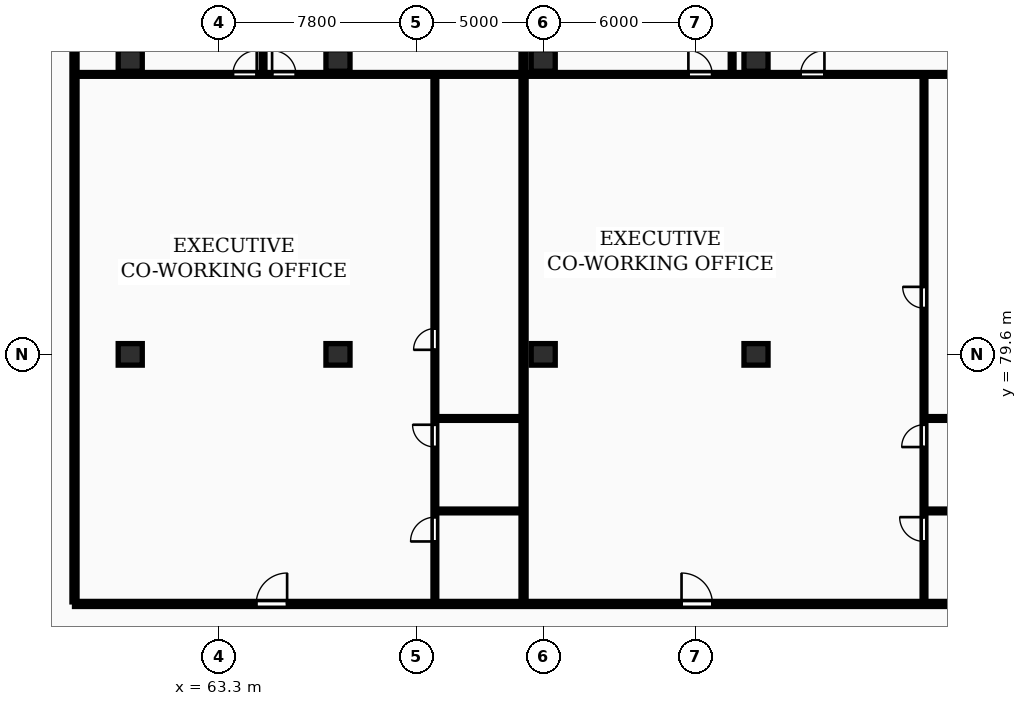
"""IFC4 building model, lengths in metres.
Left out: names, types, materials, properties, quantities, classifications, styles, units other than length and angle.
Written with IfcOpenShell. Run it as: python <this file> out.ifc"""

import sys

from ifc_helpers import new_model, si_unit, direction, frame, frame_2d, origin, origin_2d, place, context, subcontext, project, spatial, rectangle, extrude, element, fill, save


model = new_model("IFC4")
c1 = context("Model", 3, precision=1e-05, world=origin(), true_north=direction((0.0, 1.0)))
c2 = subcontext(c1, "Body", "Model", "MODEL_VIEW")
j1 = project(units=[si_unit("LENGTHUNIT", "METRE"), si_unit("PLANEANGLEUNIT", "RADIAN")], contexts=[c1])
p1 = place(None, origin())
s1 = spatial("IfcSite", under=j1, at=p1, CompositionType="ELEMENT")
p2 = place(p1, origin())
s2 = spatial("IfcBuilding", under=s1, at=p2, CompositionType="ELEMENT")
p3 = place(p2, frame((0.0, 0.0, 106.8)))
s3 = spatial("IfcBuildingStorey", under=s2, at=p3, CompositionType="ELEMENT", Elevation=106.8)
for number, where, z_axis, x_axis in (
    (1, (59.8, 79.6, 0.0), (0.0, 0.0, 1.0), (1.0, 0.0, 0.0)),
    (2, (59.8, 91.2, 0.0), (0.0, 0.0, 1.0), (1.0, 0.0, 0.0)),
    (3, (68.0, 79.6, 0.0), (0.0, 0.0, 1.0), (1.0, 0.0, 0.0)),
    (4, (68.0, 91.2, 0.0), (0.0, 0.0, 1.0), (1.0, 0.0, 0.0)),
    (5, (76.1, 79.6, 0.0), (0.0, 0.0, 1.0), (1.0, 0.0, 0.0)),
    (6, (76.1, 91.2, 0.0), (0.0, 0.0, 1.0), (1.0, 0.0, 0.0)),
    (7, (84.5, 79.6, 0.0), (0.0, 0.0, 1.0), (1.0, 0.0, 0.0)),
    (8, (84.5, 91.2, 0.0), (0.0, 0.0, 1.0), (1.0, 0.0, 0.0)),
):
    element("IfcColumn", number, at=place(p3, frame(where, z_axis=z_axis, x_axis=x_axis)), inside=s3, PredefinedType="COLUMN", context=c2, shape_type="SweptSolid", body=[
        extrude(rectangle(XDim=0.95, YDim=0.85, at=origin_2d()), origin(), (0.0, 0.0, 1.0), 3.25),
    ])
for number, where, z_axis, x_axis in (
    (9, (57.6, 69.83, 0.0), (0.0, 0.0, 1.0), (0.0, 1.0, 0.0)),
    (10, (75.325, 69.83, 0.0), (0.0, 0.0, 1.0), (0.0, 1.0, 0.0)),
):
    element("IfcWall", number, at=place(p3, frame(where, z_axis=z_axis, x_axis=x_axis)), inside=s3, PredefinedType="PARTITIONING", context=c2, shape_type="SweptSolid", body=[
        extrude(rectangle(XDim=26.07, YDim=0.2, at=frame_2d((13.035, 0.0))), origin(), (0.0, 0.0, 1.0), 2.97),
    ])
for number, where, z_axis, x_axis in (
    (11, (71.885, 73.42, 0.0), (0.0, 0.0, 1.0), (1.0, 0.0, 0.0)),
    (12, (71.885, 77.07, 0.0), (0.0, 0.0, 1.0), (1.0, 0.0, 0.0)),
):
    element("IfcWall", number, at=place(p3, frame(where, z_axis=z_axis, x_axis=x_axis)), inside=s3, PredefinedType="PARTITIONING", context=c2, shape_type="SweptSolid", body=[
        extrude(rectangle(XDim=3.36, YDim=0.15, at=frame_2d((1.68, 0.0))), origin(), (0.0, 0.0, 1.0), 2.97),
    ])
p4 = place(p3, frame((71.825, 69.81, 0.0), z_axis=(0.0, 0.0, 1.0), x_axis=(0.0, 1.0, 0.0)))
e13 = element("IfcWall", 13, at=p4, inside=s3, PredefinedType="PARTITIONING", context=c2, shape_type="SweptSolid", body=[
    extrude(rectangle(XDim=20.78, YDim=0.15, at=frame_2d((10.39, 0.0))), origin(), (0.0, 0.0, 1.0), 2.97),
])
p5 = place(p4, frame((2.406, 0.0, 0.0)))
e14 = element("IfcOpeningElement", 14, at=p5, cuts=e13, PredefinedType="OPENING", context=c2, shape_type="SweptSolid", body=[
    extrude(rectangle(XDim=0.96, YDim=2.1, at=frame_2d((0.48, 1.05))), frame((0.0, 0.085, 0.0), z_axis=(0.0, -1.0, 0.0), x_axis=(1.0, 0.0, 0.0)), (0.0, 0.0, 1.0), 0.17),
])
p6 = place(p4, frame((6.133, 0.0, 0.0)))
e15 = element("IfcOpeningElement", 15, at=p6, cuts=e13, PredefinedType="OPENING", context=c2, shape_type="SweptSolid", body=[
    extrude(rectangle(XDim=0.88, YDim=2.06, at=frame_2d((0.44, 1.03))), frame((0.0, 0.085, 0.0), z_axis=(0.0, -1.0, 0.0), x_axis=(1.0, 0.0, 0.0)), (0.0, 0.0, 1.0), 0.17),
])
p7 = place(p4, frame((9.97, 0.0, 0.0)))
e16 = element("IfcOpeningElement", 16, at=p7, cuts=e13, PredefinedType="OPENING", context=c2, shape_type="SweptSolid", body=[
    extrude(rectangle(XDim=0.84, YDim=2.04, at=frame_2d((0.42, 1.02))), frame((0.0, 0.085, 0.0), z_axis=(0.0, -1.0, 0.0), x_axis=(1.0, 0.0, 0.0)), (0.0, 0.0, 1.0), 0.17),
])
p8 = place(p3, frame((65.042, 90.73, 0.0), z_axis=(0.0, 0.0, 1.0), x_axis=(0.0, 1.0, 0.0)))
e17 = element("IfcWall", 17, at=p8, inside=s3, PredefinedType="PARTITIONING", context=c2, shape_type="SweptSolid", body=[
    extrude(rectangle(XDim=5.17, YDim=0.15, at=frame_2d((2.585, 0.0))), origin(), (0.0, 0.0, 1.0), 2.97),
])
p9 = place(p3, frame((57.68, 90.65, 0.0), z_axis=(0.0, 0.0, 1.0), x_axis=(1.0, 0.0, 0.0)))
e18 = element("IfcWall", 18, at=p9, inside=s3, PredefinedType="PARTITIONING", context=c2, shape_type="SweptSolid", body=[
    extrude(rectangle(XDim=17.565, YDim=0.15, at=frame_2d((8.782, 0.0))), origin(), (0.0, 0.0, 1.0), 2.97),
])
p10 = place(p9, frame((6.172, 0.0, 0.0)))
e19 = element("IfcOpeningElement", 19, at=p10, cuts=e18, PredefinedType="OPENING", context=c2, shape_type="SweptSolid", body=[
    extrude(rectangle(XDim=0.94, YDim=2.1, at=frame_2d((0.47, 1.05))), frame((0.0, 0.085, 0.0), z_axis=(0.0, -1.0, 0.0), x_axis=(1.0, 0.0, 0.0)), (0.0, 0.0, 1.0), 0.17),
])
p11 = place(p9, frame((7.719, 0.0, 0.0)))
e20 = element("IfcOpeningElement", 20, at=p11, cuts=e18, PredefinedType="OPENING", context=c2, shape_type="SweptSolid", body=[
    extrude(rectangle(XDim=0.94, YDim=2.1, at=frame_2d((0.47, 1.05))), frame((0.0, 0.085, 0.0), z_axis=(0.0, -1.0, 0.0), x_axis=(1.0, 0.0, 0.0)), (0.0, 0.0, 1.0), 0.17),
])
for number, where, z_axis, x_axis in (
    (21, (91.191, 73.42, 0.0), (0.0, 0.0, 1.0), (1.0, 0.0, 0.0)),
    (22, (91.191, 77.07, 0.0), (0.0, 0.0, 1.0), (1.0, 0.0, 0.0)),
):
    element("IfcWall", number, at=place(p3, frame(where, z_axis=z_axis, x_axis=x_axis)), inside=s3, PredefinedType="PARTITIONING", context=c2, shape_type="SweptSolid", body=[
        extrude(rectangle(XDim=3.13, YDim=0.15, at=frame_2d((1.565, 0.0))), origin(), (0.0, 0.0, 1.0), 2.97),
    ])
p12 = place(p3, frame((91.131, 69.81, 0.0), z_axis=(0.0, 0.0, 1.0), x_axis=(0.0, 1.0, 0.0)))
e23 = element("IfcWall", 23, at=p12, inside=s3, PredefinedType="PARTITIONING", context=c2, shape_type="SweptSolid", body=[
    extrude(rectangle(XDim=20.78, YDim=0.15, at=frame_2d((10.39, 0.0))), origin(), (0.0, 0.0, 1.0), 2.97),
])
p13 = place(p12, frame((2.406, 0.0, 0.0)))
e24 = element("IfcOpeningElement", 24, at=p13, cuts=e23, PredefinedType="OPENING", context=c2, shape_type="SweptSolid", body=[
    extrude(rectangle(XDim=0.96, YDim=2.1, at=frame_2d((0.48, 1.05))), frame((0.0, 0.085, 0.0), z_axis=(0.0, -1.0, 0.0), x_axis=(1.0, 0.0, 0.0)), (0.0, 0.0, 1.0), 0.17),
])
p14 = place(p12, frame((6.133, 0.0, 0.0)))
e25 = element("IfcOpeningElement", 25, at=p14, cuts=e23, PredefinedType="OPENING", context=c2, shape_type="SweptSolid", body=[
    extrude(rectangle(XDim=0.88, YDim=2.06, at=frame_2d((0.44, 1.03))), frame((0.0, 0.085, 0.0), z_axis=(0.0, -1.0, 0.0), x_axis=(1.0, 0.0, 0.0)), (0.0, 0.0, 1.0), 0.17),
])
p15 = place(p12, frame((11.615, 0.0, 0.0)))
e26 = element("IfcOpeningElement", 26, at=p15, cuts=e23, PredefinedType="OPENING", context=c2, shape_type="SweptSolid", body=[
    extrude(rectangle(XDim=0.84, YDim=2.04, at=frame_2d((0.42, 1.02))), frame((0.0, 0.085, 0.0), z_axis=(0.0, -1.0, 0.0), x_axis=(1.0, 0.0, 0.0)), (0.0, 0.0, 1.0), 0.17),
])
p16 = place(p3, frame((83.558, 90.73, 0.0), z_axis=(0.0, 0.0, 1.0), x_axis=(0.0, 1.0, 0.0)))
e27 = element("IfcWall", 27, at=p16, inside=s3, PredefinedType="PARTITIONING", context=c2, shape_type="SweptSolid", body=[
    extrude(rectangle(XDim=5.17, YDim=0.15, at=frame_2d((2.585, 0.0))), origin(), (0.0, 0.0, 1.0), 2.97),
])
p17 = place(p3, frame((75.405, 90.65, 0.0), z_axis=(0.0, 0.0, 1.0), x_axis=(1.0, 0.0, 0.0)))
e28 = element("IfcWall", 28, at=p17, inside=s3, PredefinedType="PARTITIONING", context=c2, shape_type="SweptSolid", body=[
    extrude(rectangle(XDim=18.916, YDim=0.15, at=frame_2d((9.458, 0.0))), origin(), (0.0, 0.0, 1.0), 2.97),
])
p18 = place(p17, frame((6.426, 0.0, 0.0)))
e29 = element("IfcOpeningElement", 29, at=p18, cuts=e28, PredefinedType="OPENING", context=c2, shape_type="SweptSolid", body=[
    extrude(rectangle(XDim=0.94, YDim=2.1, at=frame_2d((0.47, 1.05))), frame((0.0, 0.085, 0.0), z_axis=(0.0, -1.0, 0.0), x_axis=(1.0, 0.0, 0.0)), (0.0, 0.0, 1.0), 0.17),
])
p19 = place(p17, frame((10.856, 0.0, 0.0)))
e30 = element("IfcOpeningElement", 30, at=p19, cuts=e28, PredefinedType="OPENING", context=c2, shape_type="SweptSolid", body=[
    extrude(rectangle(XDim=0.94, YDim=2.1, at=frame_2d((0.47, 1.05))), frame((0.0, 0.085, 0.0), z_axis=(0.0, -1.0, 0.0), x_axis=(1.0, 0.0, 0.0)), (0.0, 0.0, 1.0), 0.17),
])
p20 = place(p3, frame((57.6, 69.75, 0.0), z_axis=(0.0, 0.0, 1.0), x_axis=(1.0, 0.0, 0.0)))
e31 = element("IfcWall", 31, at=p20, inside=s3, PredefinedType="PARTITIONING", context=c2, shape_type="SweptSolid", body=[
    extrude(rectangle(XDim=73.0, YDim=0.2, at=frame_2d((36.5, 0.0))), origin(), (0.0, 0.0, 1.0), 2.97),
])
p21 = place(p20, frame((7.172, 0.0, 0.0)))
e32 = element("IfcOpeningElement", 32, at=p21, cuts=e31, PredefinedType="OPENING", context=c2, shape_type="SweptSolid", body=[
    extrude(rectangle(XDim=1.22, YDim=2.18, at=frame_2d((0.61, 1.09))), frame((0.0, 0.11, 0.0), z_axis=(0.0, -1.0, 0.0), x_axis=(1.0, 0.0, 0.0)), (0.0, 0.0, 1.0), 0.22),
])
p22 = place(p20, frame((23.96, 0.0, 0.0)))
e33 = element("IfcOpeningElement", 33, at=p22, cuts=e31, PredefinedType="OPENING", context=c2, shape_type="SweptSolid", body=[
    extrude(rectangle(XDim=1.22, YDim=2.18, at=frame_2d((0.61, 1.09))), frame((0.0, 0.11, 0.0), z_axis=(0.0, -1.0, 0.0), x_axis=(1.0, 0.0, 0.0)), (0.0, 0.0, 1.0), 0.22),
])
p23 = place(p20, frame((38.846, 0.0, 0.0)))
e34 = element("IfcOpeningElement", 34, at=p23, cuts=e31, PredefinedType="OPENING", context=c2, shape_type="SweptSolid", body=[
    extrude(rectangle(XDim=0.95, YDim=2.15, at=frame_2d((0.475, 1.075))), frame((0.0, 0.11, 0.0), z_axis=(0.0, -1.0, 0.0), x_axis=(1.0, 0.0, 0.0)), (0.0, 0.0, 1.0), 0.22),
])
p24 = place(p20, frame((50.262, 0.0, 0.0)))
e35 = element("IfcOpeningElement", 35, at=p24, cuts=e31, PredefinedType="OPENING", context=c2, shape_type="SweptSolid", body=[
    extrude(rectangle(XDim=0.95, YDim=2.15, at=frame_2d((0.475, 1.075))), frame((0.0, 0.11, 0.0), z_axis=(0.0, -1.0, 0.0), x_axis=(1.0, 0.0, 0.0)), (0.0, 0.0, 1.0), 0.22),
])
p25 = place(p20, frame((63.754, 0.0, 0.0)))
e36 = element("IfcOpeningElement", 36, at=p25, cuts=e31, PredefinedType="OPENING", context=c2, shape_type="SweptSolid", body=[
    extrude(rectangle(XDim=0.95, YDim=2.15, at=frame_2d((0.475, 1.075))), frame((0.0, 0.11, 0.0), z_axis=(0.0, -1.0, 0.0), x_axis=(1.0, 0.0, 0.0)), (0.0, 0.0, 1.0), 0.22),
])
p26 = place(p5, origin())
e37 = element("IfcDoor", 37, at=p26, inside=s3, OperationType="SINGLE_SWING_LEFT", PredefinedType="DOOR", context=c2, shape_type="SweptSolid", body=[
    extrude(rectangle(XDim=0.96, YDim=2.1, at=frame_2d((0.48, 1.05))), frame((0.0, 0.025, 0.0), z_axis=(0.0, -1.0, 0.0), x_axis=(1.0, 0.0, 0.0)), (0.0, 0.0, 1.0), 0.05),
])
fill(e14, e37)
p27 = place(p6, origin())
e38 = element("IfcDoor", 38, at=p27, inside=s3, OperationType="SINGLE_SWING_RIGHT", PredefinedType="DOOR", context=c2, shape_type="SweptSolid", body=[
    extrude(rectangle(XDim=0.88, YDim=2.06, at=frame_2d((0.44, 1.03))), frame((0.0, 0.025, 0.0), z_axis=(0.0, -1.0, 0.0), x_axis=(1.0, 0.0, 0.0)), (0.0, 0.0, 1.0), 0.05),
])
fill(e15, e38)
p28 = place(p7, origin())
e39 = element("IfcDoor", 39, at=p28, inside=s3, OperationType="SINGLE_SWING_LEFT", PredefinedType="DOOR", context=c2, shape_type="SweptSolid", body=[
    extrude(rectangle(XDim=0.84, YDim=2.04, at=frame_2d((0.42, 1.02))), frame((0.0, 0.025, 0.0), z_axis=(0.0, -1.0, 0.0), x_axis=(1.0, 0.0, 0.0)), (0.0, 0.0, 1.0), 0.05),
])
fill(e16, e39)
p29 = place(p10, origin())
e40 = element("IfcDoor", 40, at=p29, inside=s3, OperationType="SINGLE_SWING_RIGHT", PredefinedType="DOOR", context=c2, shape_type="SweptSolid", body=[
    extrude(rectangle(XDim=0.94, YDim=2.1, at=frame_2d((0.47, 1.05))), frame((0.0, 0.025, 0.0), z_axis=(0.0, -1.0, 0.0), x_axis=(1.0, 0.0, 0.0)), (0.0, 0.0, 1.0), 0.05),
])
fill(e19, e40)
p30 = place(p11, origin())
e41 = element("IfcDoor", 41, at=p30, inside=s3, OperationType="SINGLE_SWING_LEFT", PredefinedType="DOOR", context=c2, shape_type="SweptSolid", body=[
    extrude(rectangle(XDim=0.94, YDim=2.1, at=frame_2d((0.47, 1.05))), frame((0.0, 0.025, 0.0), z_axis=(0.0, -1.0, 0.0), x_axis=(1.0, 0.0, 0.0)), (0.0, 0.0, 1.0), 0.05),
])
fill(e20, e41)
p31 = place(p13, origin())
e42 = element("IfcDoor", 42, at=p31, inside=s3, OperationType="SINGLE_SWING_RIGHT", PredefinedType="DOOR", context=c2, shape_type="SweptSolid", body=[
    extrude(rectangle(XDim=0.96, YDim=2.1, at=frame_2d((0.48, 1.05))), frame((0.0, 0.025, 0.0), z_axis=(0.0, -1.0, 0.0), x_axis=(1.0, 0.0, 0.0)), (0.0, 0.0, 1.0), 0.05),
])
fill(e24, e42)
p32 = place(p14, origin())
e43 = element("IfcDoor", 43, at=p32, inside=s3, OperationType="SINGLE_SWING_LEFT", PredefinedType="DOOR", context=c2, shape_type="SweptSolid", body=[
    extrude(rectangle(XDim=0.88, YDim=2.06, at=frame_2d((0.44, 1.03))), frame((0.0, 0.025, 0.0), z_axis=(0.0, -1.0, 0.0), x_axis=(1.0, 0.0, 0.0)), (0.0, 0.0, 1.0), 0.05),
])
fill(e25, e43)
p33 = place(p15, origin())
e44 = element("IfcDoor", 44, at=p33, inside=s3, OperationType="SINGLE_SWING_RIGHT", PredefinedType="DOOR", context=c2, shape_type="SweptSolid", body=[
    extrude(rectangle(XDim=0.84, YDim=2.04, at=frame_2d((0.42, 1.02))), frame((0.0, 0.025, 0.0), z_axis=(0.0, -1.0, 0.0), x_axis=(1.0, 0.0, 0.0)), (0.0, 0.0, 1.0), 0.05),
])
fill(e26, e44)
p34 = place(p18, origin())
e45 = element("IfcDoor", 45, at=p34, inside=s3, OperationType="SINGLE_SWING_LEFT", PredefinedType="DOOR", context=c2, shape_type="SweptSolid", body=[
    extrude(rectangle(XDim=0.94, YDim=2.1, at=frame_2d((0.47, 1.05))), frame((0.0, 0.025, 0.0), z_axis=(0.0, -1.0, 0.0), x_axis=(1.0, 0.0, 0.0)), (0.0, 0.0, 1.0), 0.05),
])
fill(e29, e45)
p35 = place(p19, origin())
e46 = element("IfcDoor", 46, at=p35, inside=s3, OperationType="SINGLE_SWING_RIGHT", PredefinedType="DOOR", context=c2, shape_type="SweptSolid", body=[
    extrude(rectangle(XDim=0.94, YDim=2.1, at=frame_2d((0.47, 1.05))), frame((0.0, 0.025, 0.0), z_axis=(0.0, -1.0, 0.0), x_axis=(1.0, 0.0, 0.0)), (0.0, 0.0, 1.0), 0.05),
])
fill(e30, e46)
p36 = place(p21, origin())
e47 = element("IfcDoor", 47, at=p36, inside=s3, OperationType="SINGLE_SWING_RIGHT", PredefinedType="DOOR", context=c2, shape_type="SweptSolid", body=[
    extrude(rectangle(XDim=1.22, YDim=2.18, at=frame_2d((0.61, 1.09))), frame((0.0, 0.025, 0.0), z_axis=(0.0, -1.0, 0.0), x_axis=(1.0, 0.0, 0.0)), (0.0, 0.0, 1.0), 0.05),
])
fill(e32, e47)
p37 = place(p22, origin())
e48 = element("IfcDoor", 48, at=p37, inside=s3, OperationType="SINGLE_SWING_LEFT", PredefinedType="DOOR", context=c2, shape_type="SweptSolid", body=[
    extrude(rectangle(XDim=1.22, YDim=2.18, at=frame_2d((0.61, 1.09))), frame((0.0, 0.025, 0.0), z_axis=(0.0, -1.0, 0.0), x_axis=(1.0, 0.0, 0.0)), (0.0, 0.0, 1.0), 0.05),
])
fill(e33, e48)
save(model, sys.argv[1])
